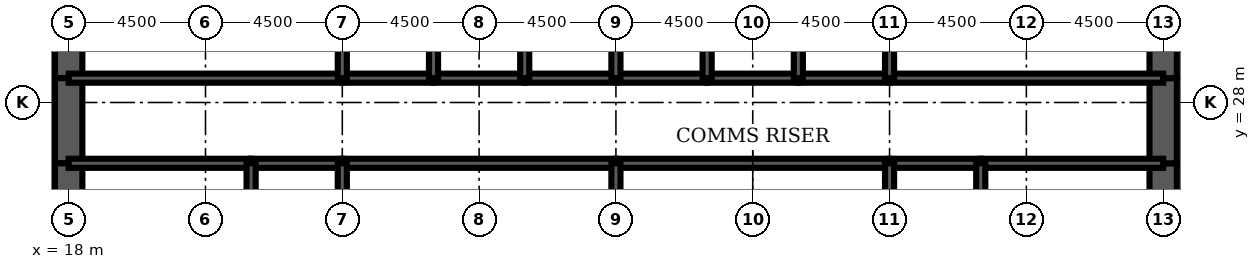
"""IFC4 building model, lengths in metres.
Left out: names, types, materials, properties, quantities, classifications, styles, units other than length and angle.
Written with IfcOpenShell. Run it as: python <this file> out.ifc"""

import sys

from ifc_helpers import new_model, si_unit, direction, frame, frame_2d, origin, place, context, subcontext, project, spatial, rectangle, extrude, element, fill, save


model = new_model("IFC4")
c1 = context("Model", 3, precision=1e-05, world=origin(), true_north=direction((0.0, 1.0)))
c2 = subcontext(c1, "Body", "Model", "MODEL_VIEW")
j1 = project(units=[si_unit("LENGTHUNIT", "METRE"), si_unit("PLANEANGLEUNIT", "RADIAN")], contexts=[c1])
p1 = place(None, origin())
s1 = spatial("IfcSite", under=j1, at=p1, CompositionType="ELEMENT")
p2 = place(p1, origin())
s2 = spatial("IfcBuilding", under=s1, at=p2, CompositionType="ELEMENT")
p3 = place(p2, frame((0.0, 0.0, 180.3)))
s3 = spatial("IfcBuildingStorey", under=s2, at=p3, CompositionType="ELEMENT", Elevation=180.3)
p4 = place(p3, frame((18.0, 32.0, 0.0), z_axis=(0.0, 0.0, 1.0), x_axis=(0.0, -1.0, 0.0)))
e1 = element("IfcWall", 1, at=p4, inside=s3, PredefinedType="SHEAR", context=c2, shape_type="SweptSolid", body=[
    extrude(rectangle(XDim=3.2, YDim=0.9, at=frame_2d((1.6, 0.0))), origin(), (0.0, 0.0, 1.0), 5.5),
])
p5 = place(p3, frame((18.0, 28.8, 0.0), z_axis=(0.0, 0.0, 1.0), x_axis=(0.0, -1.0, 0.0)))
e2 = element("IfcWall", 2, at=p5, inside=s3, PredefinedType="SHEAR", context=c2, shape_type="SweptSolid", body=[
    extrude(rectangle(XDim=2.8, YDim=0.9, at=frame_2d((1.4, 0.0))), origin(), (0.0, 0.0, 1.0), 5.5),
])
p6 = place(p5, frame((0.4, 0.0, 0.0)))
e3 = element("IfcOpeningElement", 3, at=p6, cuts=e2, PredefinedType="OPENING", context=c2, shape_type="SweptSolid", body=[
    extrude(rectangle(XDim=1.8, YDim=2.1, at=frame_2d((0.9, 1.05))), frame((0.0, 0.46, 0.0), z_axis=(0.0, -1.0, 0.0), x_axis=(1.0, 0.0, 0.0)), (0.0, 0.0, 1.0), 0.92),
])
for number, where, z_axis, x_axis in (
    (4, (18.0, 26.0, 0.0), (0.0, 0.0, 1.0), (0.0, -1.0, 0.0)),
    (5, (54.0, 22.0, 0.0), (0.0, 0.0, 1.0), (0.0, 1.0, 0.0)),
):
    element("IfcWall", number, at=place(p3, frame(where, z_axis=z_axis, x_axis=x_axis)), inside=s3, PredefinedType="SHEAR", context=c2, shape_type="SweptSolid", body=[
        extrude(rectangle(XDim=4.0, YDim=0.9, at=frame_2d((2.0, 0.0))), origin(), (0.0, 0.0, 1.0), 5.5),
    ])
p7 = place(p3, frame((54.0, 26.0, 0.0), z_axis=(0.0, 0.0, 1.0), x_axis=(0.0, 1.0, 0.0)))
e6 = element("IfcWall", 6, at=p7, inside=s3, PredefinedType="SHEAR", context=c2, shape_type="SweptSolid", body=[
    extrude(rectangle(XDim=2.8, YDim=0.9, at=frame_2d((1.4, 0.0))), origin(), (0.0, 0.0, 1.0), 5.5),
])
p8 = place(p7, frame((0.6, 0.0, 0.0)))
e7 = element("IfcOpeningElement", 7, at=p8, cuts=e6, PredefinedType="OPENING", context=c2, shape_type="SweptSolid", body=[
    extrude(rectangle(XDim=1.8, YDim=2.1, at=frame_2d((0.9, 1.05))), frame((0.0, 0.46, 0.0), z_axis=(0.0, -1.0, 0.0), x_axis=(1.0, 0.0, 0.0)), (0.0, 0.0, 1.0), 0.92),
])
p9 = place(p3, frame((54.0, 28.8, 0.0), z_axis=(0.0, 0.0, 1.0), x_axis=(0.0, 1.0, 0.0)))
e8 = element("IfcWall", 8, at=p9, inside=s3, PredefinedType="SHEAR", context=c2, shape_type="SweptSolid", body=[
    extrude(rectangle(XDim=3.2, YDim=0.9, at=frame_2d((1.6, 0.0))), origin(), (0.0, 0.0, 1.0), 5.5),
])
p10 = place(p3, frame((18.0, 28.8, 0.0), z_axis=(0.0, 0.0, 1.0), x_axis=(1.0, 0.0, 0.0)))
e9 = element("IfcWall", 9, at=p10, inside=s3, PredefinedType="SOLIDWALL", context=c2, shape_type="SweptSolid", body=[
    extrude(rectangle(XDim=9.0, YDim=0.3, at=frame_2d((4.5, 0.0))), origin(), (0.0, 0.0, 1.0), 5.5),
])
p11 = place(p10, frame((0.65, 0.0, 0.0)))
e10 = element("IfcOpeningElement", 10, at=p11, cuts=e9, PredefinedType="OPENING", context=c2, shape_type="SweptSolid", body=[
    extrude(rectangle(XDim=1.0, YDim=2.1, at=frame_2d((0.5, 1.05))), frame((0.0, 0.16, 0.0), z_axis=(0.0, -1.0, 0.0), x_axis=(1.0, 0.0, 0.0)), (0.0, 0.0, 1.0), 0.32),
])
p12 = place(p3, frame((27.0, 28.8, 0.0), z_axis=(0.0, 0.0, 1.0), x_axis=(1.0, 0.0, 0.0)))
e11 = element("IfcWall", 11, at=p12, inside=s3, PredefinedType="SOLIDWALL", context=c2, shape_type="SweptSolid", body=[
    extrude(rectangle(XDim=3.0, YDim=0.3, at=frame_2d((1.5, 0.0))), origin(), (0.0, 0.0, 1.0), 5.5),
])
p13 = place(p12, frame((0.95, 0.0, 0.0)))
e12 = element("IfcOpeningElement", 12, at=p13, cuts=e11, PredefinedType="OPENING", context=c2, shape_type="SweptSolid", body=[
    extrude(rectangle(XDim=1.1, YDim=2.2, at=frame_2d((0.55, 1.1))), frame((0.0, 0.16, 0.0), z_axis=(0.0, -1.0, 0.0), x_axis=(1.0, 0.0, 0.0)), (0.0, 0.0, 1.0), 0.32),
])
for number, where, z_axis, x_axis in (
    (13, (30.0, 28.8, 0.0), (0.0, 0.0, 1.0), (1.0, 0.0, 0.0)),
    (14, (33.0, 28.8, 0.0), (0.0, 0.0, 1.0), (1.0, 0.0, 0.0)),
    (15, (36.0, 28.8, 0.0), (0.0, 0.0, 1.0), (1.0, 0.0, 0.0)),
    (16, (39.0, 28.8, 0.0), (0.0, 0.0, 1.0), (1.0, 0.0, 0.0)),
):
    element("IfcWall", number, at=place(p3, frame(where, z_axis=z_axis, x_axis=x_axis)), inside=s3, PredefinedType="SOLIDWALL", context=c2, shape_type="SweptSolid", body=[
        extrude(rectangle(XDim=3.0, YDim=0.3, at=frame_2d((1.5, 0.0))), origin(), (0.0, 0.0, 1.0), 5.5),
    ])
p14 = place(p3, frame((42.0, 28.8, 0.0), z_axis=(0.0, 0.0, 1.0), x_axis=(1.0, 0.0, 0.0)))
e17 = element("IfcWall", 17, at=p14, inside=s3, PredefinedType="SOLIDWALL", context=c2, shape_type="SweptSolid", body=[
    extrude(rectangle(XDim=3.0, YDim=0.3, at=frame_2d((1.5, 0.0))), origin(), (0.0, 0.0, 1.0), 5.5),
])
p15 = place(p14, frame((0.95, 0.0, 0.0)))
e18 = element("IfcOpeningElement", 18, at=p15, cuts=e17, PredefinedType="OPENING", context=c2, shape_type="SweptSolid", body=[
    extrude(rectangle(XDim=1.1, YDim=2.2, at=frame_2d((0.55, 1.1))), frame((0.0, 0.16, 0.0), z_axis=(0.0, -1.0, 0.0), x_axis=(1.0, 0.0, 0.0)), (0.0, 0.0, 1.0), 0.32),
])
p16 = place(p3, frame((45.0, 28.8, 0.0), z_axis=(0.0, 0.0, 1.0), x_axis=(1.0, 0.0, 0.0)))
e19 = element("IfcWall", 19, at=p16, inside=s3, PredefinedType="SOLIDWALL", context=c2, shape_type="SweptSolid", body=[
    extrude(rectangle(XDim=9.0, YDim=0.3, at=frame_2d((4.5, 0.0))), origin(), (0.0, 0.0, 1.0), 5.5),
])
p17 = place(p16, frame((7.35, 0.0, 0.0)))
e20 = element("IfcOpeningElement", 20, at=p17, cuts=e19, PredefinedType="OPENING", context=c2, shape_type="SweptSolid", body=[
    extrude(rectangle(XDim=1.0, YDim=2.1, at=frame_2d((0.5, 1.05))), frame((0.0, 0.16, 0.0), z_axis=(0.0, -1.0, 0.0), x_axis=(1.0, 0.0, 0.0)), (0.0, 0.0, 1.0), 0.32),
])
p18 = place(p3, frame((18.0, 26.0, 0.0), z_axis=(0.0, 0.0, 1.0), x_axis=(1.0, 0.0, 0.0)))
e21 = element("IfcWall", 21, at=p18, inside=s3, PredefinedType="SOLIDWALL", context=c2, shape_type="SweptSolid", body=[
    extrude(rectangle(XDim=6.0, YDim=0.3, at=frame_2d((3.0, 0.0))), origin(), (0.0, 0.0, 1.0), 5.5),
])
p19 = place(p3, frame((24.0, 26.0, 0.0), z_axis=(0.0, 0.0, 1.0), x_axis=(1.0, 0.0, 0.0)))
e22 = element("IfcWall", 22, at=p19, inside=s3, PredefinedType="SOLIDWALL", context=c2, shape_type="SweptSolid", body=[
    extrude(rectangle(XDim=3.0, YDim=0.3, at=frame_2d((1.5, 0.0))), origin(), (0.0, 0.0, 1.0), 5.5),
])
for number, where, z_axis, x_axis in (
    (23, (27.0, 26.0, 0.0), (0.0, 0.0, 1.0), (1.0, 0.0, 0.0)),
    (24, (36.0, 26.0, 0.0), (0.0, 0.0, 1.0), (1.0, 0.0, 0.0)),
):
    element("IfcWall", number, at=place(p3, frame(where, z_axis=z_axis, x_axis=x_axis)), inside=s3, PredefinedType="SOLIDWALL", context=c2, shape_type="SweptSolid", body=[
        extrude(rectangle(XDim=9.0, YDim=0.3, at=frame_2d((4.5, 0.0))), origin(), (0.0, 0.0, 1.0), 5.5),
    ])
p20 = place(p3, frame((45.0, 26.0, 0.0), z_axis=(0.0, 0.0, 1.0), x_axis=(1.0, 0.0, 0.0)))
e25 = element("IfcWall", 25, at=p20, inside=s3, PredefinedType="SOLIDWALL", context=c2, shape_type="SweptSolid", body=[
    extrude(rectangle(XDim=3.0, YDim=0.3, at=frame_2d((1.5, 0.0))), origin(), (0.0, 0.0, 1.0), 5.5),
])
p21 = place(p3, frame((48.0, 26.0, 0.0), z_axis=(0.0, 0.0, 1.0), x_axis=(1.0, 0.0, 0.0)))
e26 = element("IfcWall", 26, at=p21, inside=s3, PredefinedType="SOLIDWALL", context=c2, shape_type="SweptSolid", body=[
    extrude(rectangle(XDim=6.0, YDim=0.3, at=frame_2d((3.0, 0.0))), origin(), (0.0, 0.0, 1.0), 5.5),
])
for number, where, z_axis, x_axis in (
    (27, (27.0, 28.8, 0.0), (0.0, 0.0, 1.0), (0.0, 1.0, 0.0)),
    (28, (30.0, 28.8, 0.0), (0.0, 0.0, 1.0), (0.0, 1.0, 0.0)),
    (29, (33.0, 28.8, 0.0), (0.0, 0.0, 1.0), (0.0, 1.0, 0.0)),
    (30, (36.0, 28.8, 0.0), (0.0, 0.0, 1.0), (0.0, 1.0, 0.0)),
    (31, (39.0, 28.8, 0.0), (0.0, 0.0, 1.0), (0.0, 1.0, 0.0)),
    (32, (42.0, 28.8, 0.0), (0.0, 0.0, 1.0), (0.0, 1.0, 0.0)),
    (33, (45.0, 28.8, 0.0), (0.0, 0.0, 1.0), (0.0, 1.0, 0.0)),
):
    element("IfcWall", number, at=place(p3, frame(where, z_axis=z_axis, x_axis=x_axis)), inside=s3, PredefinedType="SOLIDWALL", context=c2, shape_type="SweptSolid", body=[
        extrude(rectangle(XDim=3.2, YDim=0.3, at=frame_2d((1.6, 0.0))), origin(), (0.0, 0.0, 1.0), 5.5),
    ])
for number, where, z_axis, x_axis in (
    (34, (24.0, 22.0, 0.0), (0.0, 0.0, 1.0), (0.0, 1.0, 0.0)),
    (35, (27.0, 22.0, 0.0), (0.0, 0.0, 1.0), (0.0, 1.0, 0.0)),
    (36, (36.0, 22.0, 0.0), (0.0, 0.0, 1.0), (0.0, 1.0, 0.0)),
    (37, (45.0, 22.0, 0.0), (0.0, 0.0, 1.0), (0.0, 1.0, 0.0)),
    (38, (48.0, 22.0, 0.0), (0.0, 0.0, 1.0), (0.0, 1.0, 0.0)),
):
    element("IfcWall", number, at=place(p3, frame(where, z_axis=z_axis, x_axis=x_axis)), inside=s3, PredefinedType="SOLIDWALL", context=c2, shape_type="SweptSolid", body=[
        extrude(rectangle(XDim=4.0, YDim=0.3, at=frame_2d((2.0, 0.0))), origin(), (0.0, 0.0, 1.0), 5.5),
    ])
p22 = place(p3, frame((38.0, 22.15, 0.0), z_axis=(0.0, 0.0, 1.0), x_axis=(0.0, 1.0, 0.0)))
e39 = element("IfcWall", 39, at=p22, inside=s3, PredefinedType="PARTITIONING", context=c2, shape_type="SweptSolid", body=[
    extrude(rectangle(XDim=3.7, YDim=0.15, at=frame_2d((1.85, 0.0))), origin(), (0.0, 0.0, 1.0), 3.0),
])
p23 = place(p22, frame((2.2, 0.0, 0.0)))
e40 = element("IfcOpeningElement", 40, at=p23, cuts=e39, PredefinedType="OPENING", context=c2, shape_type="SweptSolid", body=[
    extrude(rectangle(XDim=1.0, YDim=2.1, at=frame_2d((0.5, 1.05))), frame((0.0, 0.085, 0.0), z_axis=(0.0, -1.0, 0.0), x_axis=(1.0, 0.0, 0.0)), (0.0, 0.0, 1.0), 0.17),
])
p24 = place(p3, frame((51.975, 22.15, 0.0), z_axis=(0.0, 0.0, 1.0), x_axis=(0.0, 1.0, 0.0)))
e41 = element("IfcWall", 41, at=p24, inside=s3, PredefinedType="PARTITIONING", context=c2, shape_type="SweptSolid", body=[
    extrude(rectangle(XDim=3.7, YDim=0.15, at=frame_2d((1.85, 0.0))), origin(), (0.0, 0.0, 1.0), 3.0),
])
p25 = place(p23, origin())
e42 = element("IfcDoor", 42, at=p25, inside=s3, OperationType="SINGLE_SWING_RIGHT", PredefinedType="DOOR", context=c2, shape_type="SweptSolid", body=[
    extrude(rectangle(XDim=1.0, YDim=2.1, at=frame_2d((0.5, 1.05))), frame((0.0, 0.025, 0.0), z_axis=(0.0, -1.0, 0.0), x_axis=(1.0, 0.0, 0.0)), (0.0, 0.0, 1.0), 0.05),
])
fill(e40, e42)
p26 = place(p15, origin())
e43 = element("IfcDoor", 43, at=p26, inside=s3, OperationType="DOUBLE_DOOR_SLIDING", PredefinedType="USERDEFINED", context=c2, shape_type="SweptSolid", body=[
    extrude(rectangle(XDim=1.1, YDim=2.2, at=frame_2d((0.55, 1.1))), frame((0.0, 0.025, 0.0), z_axis=(0.0, -1.0, 0.0), x_axis=(1.0, 0.0, 0.0)), (0.0, 0.0, 1.0), 0.05),
])
fill(e18, e43)
p27 = place(p13, origin())
e44 = element("IfcDoor", 44, at=p27, inside=s3, OperationType="DOUBLE_DOOR_SLIDING", PredefinedType="USERDEFINED", context=c2, shape_type="SweptSolid", body=[
    extrude(rectangle(XDim=1.1, YDim=2.2, at=frame_2d((0.55, 1.1))), frame((0.0, 0.025, 0.0), z_axis=(0.0, -1.0, 0.0), x_axis=(1.0, 0.0, 0.0)), (0.0, 0.0, 1.0), 0.05),
])
fill(e12, e44)
p28 = place(p11, origin())
e45 = element("IfcDoor", 45, at=p28, inside=s3, OperationType="SINGLE_SWING_LEFT", PredefinedType="DOOR", context=c2, shape_type="SweptSolid", body=[
    extrude(rectangle(XDim=1.0, YDim=2.1, at=frame_2d((0.5, 1.05))), frame((0.0, 0.025, 0.0), z_axis=(0.0, -1.0, 0.0), x_axis=(1.0, 0.0, 0.0)), (0.0, 0.0, 1.0), 0.05),
])
fill(e10, e45)
p29 = place(p17, origin())
e46 = element("IfcDoor", 46, at=p29, inside=s3, OperationType="SINGLE_SWING_RIGHT", PredefinedType="DOOR", context=c2, shape_type="SweptSolid", body=[
    extrude(rectangle(XDim=1.0, YDim=2.1, at=frame_2d((0.5, 1.05))), frame((0.0, 0.025, 0.0), z_axis=(0.0, -1.0, 0.0), x_axis=(1.0, 0.0, 0.0)), (0.0, 0.0, 1.0), 0.05),
])
fill(e20, e46)
p30 = place(p6, origin())
e47 = element("IfcDoor", 47, at=p30, inside=s3, OperationType="SINGLE_SWING_LEFT", PredefinedType="DOOR", context=c2, shape_type="SweptSolid", body=[
    extrude(rectangle(XDim=1.8, YDim=2.1, at=frame_2d((0.9, 1.05))), frame((0.0, 0.45, 0.0), z_axis=(0.0, -1.0, 0.0), x_axis=(1.0, 0.0, 0.0)), (0.0, 0.0, 1.0), 0.899),
])
fill(e3, e47)
p31 = place(p8, origin())
e48 = element("IfcDoor", 48, at=p31, inside=s3, OperationType="SINGLE_SWING_LEFT", PredefinedType="DOOR", context=c2, shape_type="SweptSolid", body=[
    extrude(rectangle(XDim=1.8, YDim=2.1, at=frame_2d((0.9, 1.05))), frame((0.0, 0.45, 0.0), z_axis=(0.0, -1.0, 0.0), x_axis=(1.0, 0.0, 0.0)), (0.0, 0.0, 1.0), 0.899),
])
fill(e7, e48)
save(model, sys.argv[1])
